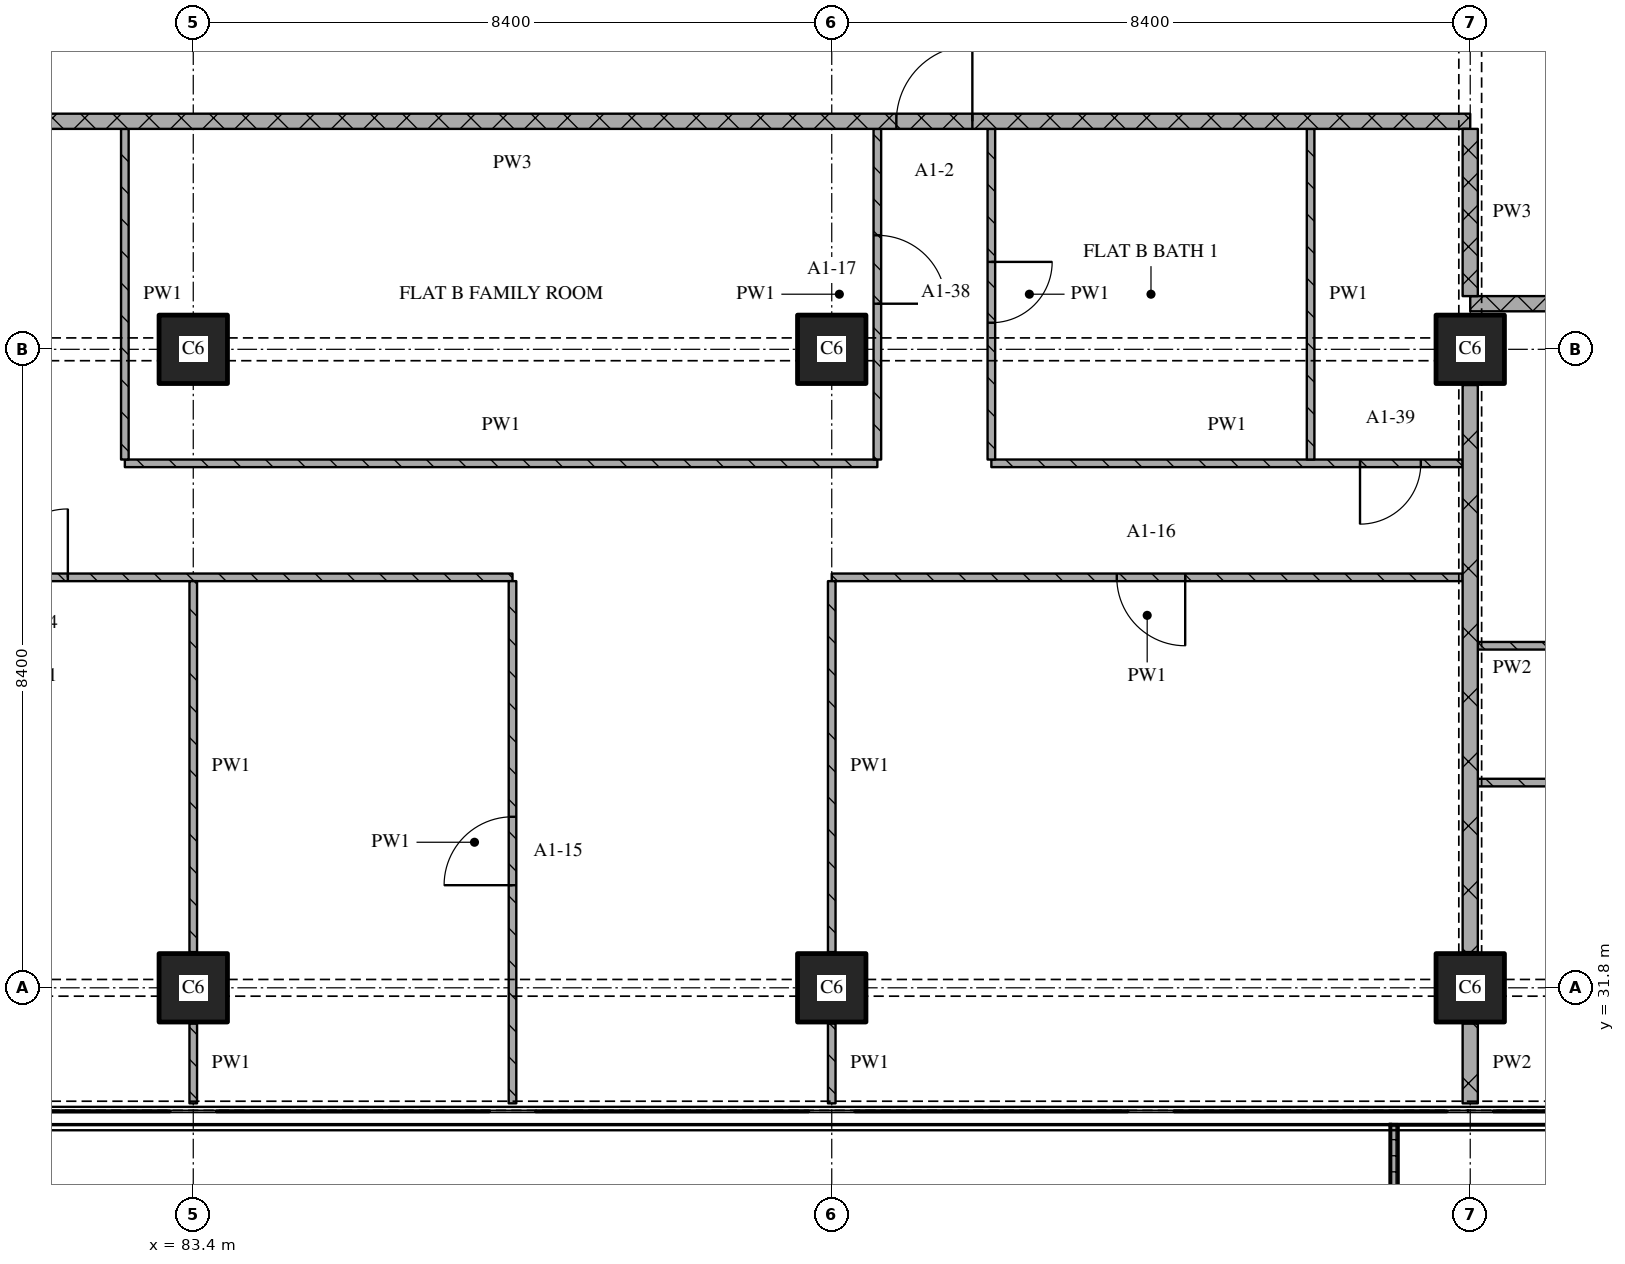
"""IFC4 building model, lengths in metres.
Left out: names, types, materials, properties, quantities, classifications, styles, units other than length and angle.
Written with IfcOpenShell. Run it as: python <this file> out.ifc"""

import sys

from ifc_helpers import new_model, si_unit, direction, frame, frame_2d, origin, origin_2d, place, context, subcontext, project, spatial, polyline, rectangle, outline, extrude, element, fill, save


model = new_model("IFC4")
c1 = context("Model", 3, precision=1e-05, world=origin(), true_north=direction((0.0, 1.0)))
c2 = subcontext(c1, "Body", "Model", "MODEL_VIEW")
j1 = project(units=[si_unit("LENGTHUNIT", "METRE"), si_unit("PLANEANGLEUNIT", "RADIAN")], contexts=[c1])
p1 = place(None, origin())
s1 = spatial("IfcSite", under=j1, at=p1, CompositionType="ELEMENT")
p2 = place(p1, origin())
s2 = spatial("IfcBuilding", under=s1, at=p2, CompositionType="ELEMENT")
p3 = place(p2, frame((0.0, 0.0, 37.2)))
s3 = spatial("IfcBuildingStorey", under=s2, at=p3, CompositionType="ELEMENT", Elevation=37.2)
for number, where, z_axis, x_axis in (
    (1, (83.4, 31.8, 0.0), (0.0, 0.0, 1.0), (1.0, 0.0, 0.0)),
    (2, (83.4, 40.2, 0.0), (0.0, 0.0, 1.0), (1.0, 0.0, 0.0)),
    (3, (91.8, 31.8, 0.0), (0.0, 0.0, 1.0), (1.0, 0.0, 0.0)),
    (4, (91.8, 40.2, 0.0), (0.0, 0.0, 1.0), (1.0, 0.0, 0.0)),
    (5, (100.2, 31.8, 0.0), (0.0, 0.0, 1.0), (1.0, 0.0, 0.0)),
    (6, (100.2, 40.2, 0.0), (0.0, 0.0, 1.0), (1.0, 0.0, 0.0)),
):
    element("IfcColumn", number, at=place(p3, frame(where, z_axis=z_axis, x_axis=x_axis)), inside=s3, PredefinedType="COLUMN", context=c2, shape_type="SweptSolid", body=[
        extrude(rectangle(XDim=0.9, YDim=0.9, at=origin_2d()), origin(), (0.0, 0.0, 1.0), 3.6),
    ])
p4 = place(p3, origin())
e7 = element("IfcWall", 7, at=p4, inside=s3, PredefinedType="SOLIDWALL", context=c2, shape_type="SweptSolid", body=[
    extrude(outline(polyline([(99.15, 30.0), (99.25, 30.0), (99.25, 28.233), (105.35, 28.233), (105.35, 30.0), (105.45, 30.0), (105.45, 28.133), (99.15, 28.133), (99.15, 30.0)])), origin(), (0.0, 0.0, 1.0), 1.0),
])
p5 = place(p3, frame((117.0, 34.5, 0.0), z_axis=(0.0, 0.0, 1.0), x_axis=(-1.0, 0.0, 0.0)))
e8 = element("IfcWall", 8, at=p5, inside=s3, PredefinedType="PARTITIONING", context=c2, shape_type="SweptSolid", body=[
    extrude(rectangle(XDim=16.7, YDim=0.1, at=frame_2d((8.35, 0.0))), origin(), (0.0, 0.0, 1.0), 3.32),
])
p6 = place(p5, frame((12.15, 0.0, 0.0)))
e9 = element("IfcOpeningElement", 9, at=p6, cuts=e8, PredefinedType="OPENING", context=c2, shape_type="SweptSolid", body=[
    extrude(rectangle(XDim=0.9, YDim=2.1, at=frame_2d((0.45, 1.05))), frame((0.0, 0.06, 0.0), z_axis=(0.0, -1.0, 0.0), x_axis=(1.0, 0.0, 0.0)), (0.0, 0.0, 1.0), 0.12),
])
p7 = place(p3, frame((100.3, 36.3, 0.0), z_axis=(0.0, 0.0, 1.0), x_axis=(1.0, 0.0, 0.0)))
e10 = element("IfcWall", 10, at=p7, inside=s3, PredefinedType="PARTITIONING", context=c2, shape_type="SweptSolid", body=[
    extrude(rectangle(XDim=11.0, YDim=0.1, at=frame_2d((5.5, 0.0))), origin(), (0.0, 0.0, 1.0), 3.32),
])
p8 = place(p7, frame((1.75, 0.0, 0.0)))
e11 = element("IfcOpeningElement", 11, at=p8, cuts=e10, PredefinedType="OPENING", context=c2, shape_type="SweptSolid", body=[
    extrude(rectangle(XDim=0.8, YDim=2.1, at=frame_2d((0.4, 1.05))), frame((0.0, 0.06, 0.0), z_axis=(0.0, -1.0, 0.0), x_axis=(1.0, 0.0, 0.0)), (0.0, 0.0, 1.0), 0.12),
])
p9 = place(p7, frame((6.25, 0.0, 0.0)))
e12 = element("IfcOpeningElement", 12, at=p9, cuts=e10, PredefinedType="OPENING", context=c2, shape_type="SweptSolid", body=[
    extrude(rectangle(XDim=0.8, YDim=2.1, at=frame_2d((0.4, 1.05))), frame((0.0, 0.06, 0.0), z_axis=(0.0, -1.0, 0.0), x_axis=(1.0, 0.0, 0.0)), (0.0, 0.0, 1.0), 0.12),
])
p10 = place(p3, frame((87.6, 37.2, 0.0), z_axis=(0.0, 0.0, 1.0), x_axis=(-1.0, 0.0, 0.0)))
e13 = element("IfcWall", 13, at=p10, inside=s3, PredefinedType="PARTITIONING", context=c2, shape_type="SweptSolid", body=[
    extrude(rectangle(XDim=12.5, YDim=0.1, at=frame_2d((6.25, 0.0))), origin(), (0.0, 0.0, 1.0), 3.32),
])
p11 = place(p10, frame((5.85, 0.0, 0.0)))
e14 = element("IfcOpeningElement", 14, at=p11, cuts=e13, PredefinedType="OPENING", context=c2, shape_type="SweptSolid", body=[
    extrude(rectangle(XDim=0.9, YDim=2.1, at=frame_2d((0.45, 1.05))), frame((0.0, 0.06, 0.0), z_axis=(0.0, -1.0, 0.0), x_axis=(1.0, 0.0, 0.0)), (0.0, 0.0, 1.0), 0.12),
])
p12 = place(p10, frame((10.05, 0.0, 0.0)))
e15 = element("IfcOpeningElement", 15, at=p12, cuts=e13, PredefinedType="OPENING", context=c2, shape_type="SweptSolid", body=[
    extrude(rectangle(XDim=0.9, YDim=2.1, at=frame_2d((0.45, 1.05))), frame((0.0, 0.06, 0.0), z_axis=(0.0, -1.0, 0.0), x_axis=(1.0, 0.0, 0.0)), (0.0, 0.0, 1.0), 0.12),
])
p13 = place(p3, frame((100.1, 37.2, 0.0), z_axis=(0.0, 0.0, 1.0), x_axis=(-1.0, 0.0, 0.0)))
e16 = element("IfcWall", 16, at=p13, inside=s3, PredefinedType="PARTITIONING", context=c2, shape_type="SweptSolid", body=[
    extrude(rectangle(XDim=8.3, YDim=0.1, at=frame_2d((4.15, 0.0))), origin(), (0.0, 0.0, 1.0), 3.32),
])
p14 = place(p13, frame((3.65, 0.0, 0.0)))
e17 = element("IfcOpeningElement", 17, at=p14, cuts=e16, PredefinedType="OPENING", context=c2, shape_type="SweptSolid", body=[
    extrude(rectangle(XDim=0.9, YDim=2.1, at=frame_2d((0.45, 1.05))), frame((0.0, 0.06, 0.0), z_axis=(0.0, -1.0, 0.0), x_axis=(1.0, 0.0, 0.0)), (0.0, 0.0, 1.0), 0.12),
])
p15 = place(p3, frame((82.5, 38.7, 0.0), z_axis=(0.0, 0.0, 1.0), x_axis=(1.0, 0.0, 0.0)))
e18 = element("IfcWall", 18, at=p15, inside=s3, PredefinedType="PARTITIONING", context=c2, shape_type="SweptSolid", body=[
    extrude(rectangle(XDim=9.9, YDim=0.1, at=frame_2d((4.95, 0.0))), origin(), (0.0, 0.0, 1.0), 3.32),
])
p16 = place(p3, frame((93.9, 38.7, 0.0), z_axis=(0.0, 0.0, 1.0), x_axis=(1.0, 0.0, 0.0)))
e19 = element("IfcWall", 19, at=p16, inside=s3, PredefinedType="PARTITIONING", context=c2, shape_type="SweptSolid", body=[
    extrude(rectangle(XDim=6.2, YDim=0.1, at=frame_2d((3.1, 0.0))), origin(), (0.0, 0.0, 1.0), 3.32),
])
p17 = place(p16, frame((4.85, 0.0, 0.0)))
e20 = element("IfcOpeningElement", 20, at=p17, cuts=e19, PredefinedType="OPENING", context=c2, shape_type="SweptSolid", body=[
    extrude(rectangle(XDim=0.8, YDim=2.1, at=frame_2d((0.4, 1.05))), frame((0.0, 0.06, 0.0), z_axis=(0.0, -1.0, 0.0), x_axis=(1.0, 0.0, 0.0)), (0.0, 0.0, 1.0), 0.12),
])
p18 = place(p3, frame((124.28, 40.8, 0.0), z_axis=(0.0, 0.0, 1.0), x_axis=(-1.0, 0.0, 0.0)))
e21 = element("IfcWall", 21, at=p18, inside=s3, PredefinedType="PARTITIONING", context=c2, shape_type="SweptSolid", body=[
    extrude(rectangle(XDim=24.08, YDim=0.2, at=frame_2d((12.04, 0.0))), origin(), (0.0, 0.0, 1.0), 3.32),
])
p19 = place(p18, frame((11.73, 0.0, 0.0)))
e22 = element("IfcOpeningElement", 22, at=p19, cuts=e21, PredefinedType="OPENING", context=c2, shape_type="SweptSolid", body=[
    extrude(rectangle(XDim=1.0, YDim=2.1, at=frame_2d((0.5, 1.05))), frame((0.0, 0.11, 0.0), z_axis=(0.0, -1.0, 0.0), x_axis=(1.0, 0.0, 0.0)), (0.0, 0.0, 1.0), 0.22),
])
p20 = place(p3, frame((100.2, 43.2, 0.0), z_axis=(0.0, 0.0, 1.0), x_axis=(-1.0, 0.0, 0.0)))
e23 = element("IfcWall", 23, at=p20, inside=s3, PredefinedType="PARTITIONING", context=c2, shape_type="SweptSolid", body=[
    extrude(rectangle(XDim=25.2, YDim=0.2, at=frame_2d((12.6, 0.0))), origin(), (0.0, 0.0, 1.0), 3.32),
])
p21 = place(p20, frame((6.55, 0.0, 0.0)))
e24 = element("IfcOpeningElement", 24, at=p21, cuts=e23, PredefinedType="OPENING", context=c2, shape_type="SweptSolid", body=[
    extrude(rectangle(XDim=1.0, YDim=2.1, at=frame_2d((0.5, 1.05))), frame((0.0, 0.11, 0.0), z_axis=(0.0, -1.0, 0.0), x_axis=(1.0, 0.0, 0.0)), (0.0, 0.0, 1.0), 0.22),
])
p22 = place(p3, frame((82.5, 43.1, 0.0), z_axis=(0.0, 0.0, 1.0), x_axis=(0.0, -1.0, 0.0)))
e25 = element("IfcWall", 25, at=p22, inside=s3, PredefinedType="PARTITIONING", context=c2, shape_type="SweptSolid", body=[
    extrude(rectangle(XDim=4.35, YDim=0.1, at=frame_2d((2.175, 0.0))), origin(), (0.0, 0.0, 1.0), 3.32),
])
p23 = place(p3, frame((83.4, 31.33, 0.0), z_axis=(0.0, 0.0, 1.0), x_axis=(0.0, -1.0, 0.0)))
e26 = element("IfcWall", 26, at=p23, inside=s3, PredefinedType="PARTITIONING", context=c2, shape_type="SweptSolid", body=[
    extrude(rectangle(XDim=1.05, YDim=0.1, at=frame_2d((0.525, 0.0))), origin(), (0.0, 0.0, 1.0), 3.32),
])
p24 = place(p3, frame((83.4, 37.15, 0.0), z_axis=(0.0, 0.0, 1.0), x_axis=(0.0, -1.0, 0.0)))
e27 = element("IfcWall", 27, at=p24, inside=s3, PredefinedType="PARTITIONING", context=c2, shape_type="SweptSolid", body=[
    extrude(rectangle(XDim=4.88, YDim=0.1, at=frame_2d((2.44, 0.0))), origin(), (0.0, 0.0, 1.0), 3.32),
])
p25 = place(p3, frame((87.6, 30.28, 0.0), z_axis=(0.0, 0.0, 1.0), x_axis=(0.0, 1.0, 0.0)))
e28 = element("IfcWall", 28, at=p25, inside=s3, PredefinedType="PARTITIONING", context=c2, shape_type="SweptSolid", body=[
    extrude(rectangle(XDim=6.87, YDim=0.1, at=frame_2d((3.435, 0.0))), origin(), (0.0, 0.0, 1.0), 3.32),
])
p26 = place(p25, frame((2.87, 0.0, 0.0)))
e29 = element("IfcOpeningElement", 29, at=p26, cuts=e28, PredefinedType="OPENING", context=c2, shape_type="SweptSolid", body=[
    extrude(rectangle(XDim=0.9, YDim=2.1, at=frame_2d((0.45, 1.05))), frame((0.0, 0.06, 0.0), z_axis=(0.0, -1.0, 0.0), x_axis=(1.0, 0.0, 0.0)), (0.0, 0.0, 1.0), 0.12),
])
p27 = place(p3, frame((91.8, 31.33, 0.0), z_axis=(0.0, 0.0, 1.0), x_axis=(0.0, -1.0, 0.0)))
e30 = element("IfcWall", 30, at=p27, inside=s3, PredefinedType="PARTITIONING", context=c2, shape_type="SweptSolid", body=[
    extrude(rectangle(XDim=1.05, YDim=0.1, at=frame_2d((0.525, 0.0))), origin(), (0.0, 0.0, 1.0), 3.32),
])
p28 = place(p3, frame((91.8, 37.15, 0.0), z_axis=(0.0, 0.0, 1.0), x_axis=(0.0, -1.0, 0.0)))
e31 = element("IfcWall", 31, at=p28, inside=s3, PredefinedType="PARTITIONING", context=c2, shape_type="SweptSolid", body=[
    extrude(rectangle(XDim=4.88, YDim=0.1, at=frame_2d((2.44, 0.0))), origin(), (0.0, 0.0, 1.0), 3.32),
])
p29 = place(p3, frame((92.4, 38.75, 0.0), z_axis=(0.0, 0.0, 1.0), x_axis=(0.0, 1.0, 0.0)))
e32 = element("IfcWall", 32, at=p29, inside=s3, PredefinedType="PARTITIONING", context=c2, shape_type="SweptSolid", body=[
    extrude(rectangle(XDim=4.35, YDim=0.1, at=frame_2d((2.175, 0.0))), origin(), (0.0, 0.0, 1.0), 3.32),
])
p30 = place(p29, frame((2.05, 0.0, 0.0)))
e33 = element("IfcOpeningElement", 33, at=p30, cuts=e32, PredefinedType="OPENING", context=c2, shape_type="SweptSolid", body=[
    extrude(rectangle(XDim=0.9, YDim=2.1, at=frame_2d((0.45, 1.05))), frame((0.0, 0.06, 0.0), z_axis=(0.0, -1.0, 0.0), x_axis=(1.0, 0.0, 0.0)), (0.0, 0.0, 1.0), 0.12),
])
p31 = place(p3, frame((93.9, 43.1, 0.0), z_axis=(0.0, 0.0, 1.0), x_axis=(0.0, -1.0, 0.0)))
e34 = element("IfcWall", 34, at=p31, inside=s3, PredefinedType="PARTITIONING", context=c2, shape_type="SweptSolid", body=[
    extrude(rectangle(XDim=4.35, YDim=0.1, at=frame_2d((2.175, 0.0))), origin(), (0.0, 0.0, 1.0), 3.32),
])
p32 = place(p31, frame((1.75, 0.0, 0.0)))
e35 = element("IfcOpeningElement", 35, at=p32, cuts=e34, PredefinedType="OPENING", context=c2, shape_type="SweptSolid", body=[
    extrude(rectangle(XDim=0.8, YDim=2.1, at=frame_2d((0.4, 1.05))), frame((0.0, 0.06, 0.0), z_axis=(0.0, -1.0, 0.0), x_axis=(1.0, 0.0, 0.0)), (0.0, 0.0, 1.0), 0.12),
])
p33 = place(p3, frame((98.1, 43.1, 0.0), z_axis=(0.0, 0.0, 1.0), x_axis=(0.0, -1.0, 0.0)))
e36 = element("IfcWall", 36, at=p33, inside=s3, PredefinedType="PARTITIONING", context=c2, shape_type="SweptSolid", body=[
    extrude(rectangle(XDim=4.35, YDim=0.1, at=frame_2d((2.175, 0.0))), origin(), (0.0, 0.0, 1.0), 3.32),
])
p34 = place(p3, frame((100.2, 43.1, 0.0), z_axis=(0.0, 0.0, 1.0), x_axis=(0.0, -1.0, 0.0)))
e37 = element("IfcWall", 37, at=p34, inside=s3, PredefinedType="PARTITIONING", context=c2, shape_type="SweptSolid", body=[
    extrude(rectangle(XDim=2.2, YDim=0.2, at=frame_2d((1.1, 0.0))), origin(), (0.0, 0.0, 1.0), 2.43),
])
p35 = place(p3, frame((100.2, 31.33, 0.0), z_axis=(0.0, 0.0, 1.0), x_axis=(0.0, -1.0, 0.0)))
e38 = element("IfcWall", 38, at=p35, inside=s3, PredefinedType="PARTITIONING", context=c2, shape_type="SweptSolid", body=[
    extrude(rectangle(XDim=1.05, YDim=0.2, at=frame_2d((0.525, 0.0))), origin(), (0.0, 0.0, 1.0), 3.32),
])
p36 = place(p3, frame((100.2, 39.73, 0.0), z_axis=(0.0, 0.0, 1.0), x_axis=(0.0, -1.0, 0.0)))
e39 = element("IfcWall", 39, at=p36, inside=s3, PredefinedType="PARTITIONING", context=c2, shape_type="SweptSolid", body=[
    extrude(rectangle(XDim=7.46, YDim=0.2, at=frame_2d((3.73, 0.0))), origin(), (0.0, 0.0, 1.0), 2.83),
])
p37 = place(p11, origin())
e40 = element("IfcDoor", 40, at=p37, inside=s3, OperationType="SINGLE_SWING_RIGHT", PredefinedType="DOOR", context=c2, shape_type="SweptSolid", body=[
    extrude(rectangle(XDim=0.9, YDim=2.1, at=frame_2d((0.45, 1.05))), frame((0.0, 0.025, 0.0), z_axis=(0.0, -1.0, 0.0), x_axis=(1.0, 0.0, 0.0)), (0.0, 0.0, 1.0), 0.05),
])
fill(e14, e40)
p38 = place(p14, origin())
e41 = element("IfcDoor", 41, at=p38, inside=s3, OperationType="SINGLE_SWING_LEFT", PredefinedType="DOOR", context=c2, shape_type="SweptSolid", body=[
    extrude(rectangle(XDim=0.9, YDim=2.1, at=frame_2d((0.45, 1.05))), frame((0.0, 0.025, 0.0), z_axis=(0.0, -1.0, 0.0), x_axis=(1.0, 0.0, 0.0)), (0.0, 0.0, 1.0), 0.05),
])
fill(e17, e41)
p39 = place(p17, origin())
e42 = element("IfcDoor", 42, at=p39, inside=s3, OperationType="SINGLE_SWING_RIGHT", PredefinedType="DOOR", context=c2, shape_type="SweptSolid", body=[
    extrude(rectangle(XDim=0.8, YDim=2.1, at=frame_2d((0.4, 1.05))), frame((0.0, 0.025, 0.0), z_axis=(0.0, -1.0, 0.0), x_axis=(1.0, 0.0, 0.0)), (0.0, 0.0, 1.0), 0.05),
])
fill(e20, e42)
p40 = place(p21, origin())
e43 = element("IfcDoor", 43, at=p40, inside=s3, OperationType="SINGLE_SWING_RIGHT", PredefinedType="DOOR", context=c2, shape_type="SweptSolid", body=[
    extrude(rectangle(XDim=1.0, YDim=2.1, at=frame_2d((0.5, 1.05))), frame((0.0, 0.025, 0.0), z_axis=(0.0, -1.0, 0.0), x_axis=(1.0, 0.0, 0.0)), (0.0, 0.0, 1.0), 0.05),
])
fill(e24, e43)
p41 = place(p26, origin())
e44 = element("IfcDoor", 44, at=p41, inside=s3, OperationType="SINGLE_SWING_LEFT", PredefinedType="DOOR", context=c2, shape_type="SweptSolid", body=[
    extrude(rectangle(XDim=0.9, YDim=2.1, at=frame_2d((0.45, 1.05))), frame((0.0, 0.025, 0.0), z_axis=(0.0, -1.0, 0.0), x_axis=(1.0, 0.0, 0.0)), (0.0, 0.0, 1.0), 0.05),
])
fill(e29, e44)
p42 = place(p30, origin())
e45 = element("IfcDoor", 45, at=p42, inside=s3, OperationType="SINGLE_SWING_RIGHT", PredefinedType="DOOR", context=c2, shape_type="SweptSolid", body=[
    extrude(rectangle(XDim=0.9, YDim=2.1, at=frame_2d((0.45, 1.05))), frame((0.0, 0.025, 0.0), z_axis=(0.0, -1.0, 0.0), x_axis=(1.0, 0.0, 0.0)), (0.0, 0.0, 1.0), 0.05),
])
fill(e33, e45)
p43 = place(p32, origin())
e46 = element("IfcDoor", 46, at=p43, inside=s3, OperationType="SINGLE_SWING_LEFT", PredefinedType="DOOR", context=c2, shape_type="SweptSolid", body=[
    extrude(rectangle(XDim=0.8, YDim=2.1, at=frame_2d((0.4, 1.05))), frame((0.0, 0.025, 0.0), z_axis=(0.0, -1.0, 0.0), x_axis=(1.0, 0.0, 0.0)), (0.0, 0.0, 1.0), 0.05),
])
fill(e35, e46)
save(model, sys.argv[1])
